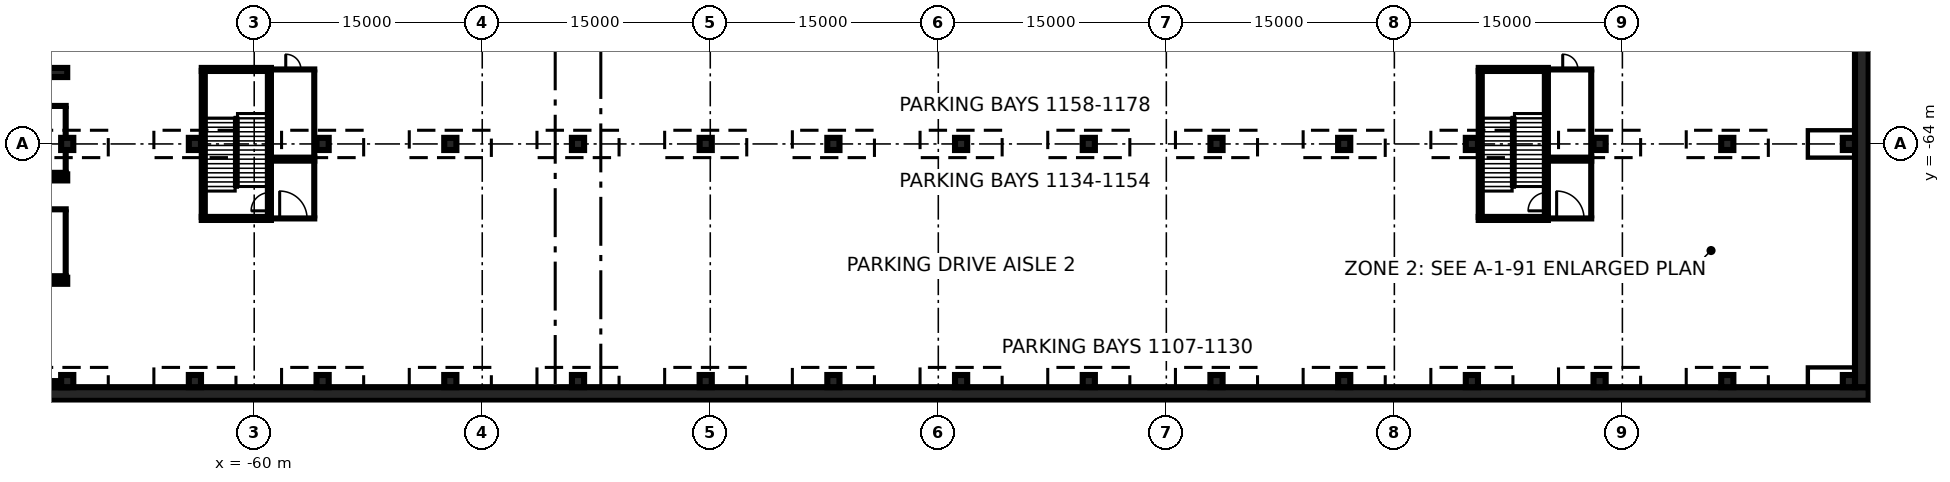
"""IFC4 building model, lengths in metres.
Left out: names, types, materials, properties, quantities, classifications, styles, units other than length and angle.
Written with IfcOpenShell. Run it as: python <this file> out.ifc"""

import sys

from ifc_helpers import new_model, si_unit, direction, frame, frame_2d, origin, origin_2d, place, context, subcontext, project, spatial, rectangle, extrude, element, fill, save


model = new_model("IFC4")
c1 = context("Model", 3, precision=1e-05, world=origin(), true_north=direction((0.0, 1.0)))
c2 = subcontext(c1, "Body", "Model", "MODEL_VIEW")
j1 = project(units=[si_unit("LENGTHUNIT", "METRE"), si_unit("PLANEANGLEUNIT", "RADIAN")], contexts=[c1])
p1 = place(None, origin())
s1 = spatial("IfcSite", under=j1, at=p1, CompositionType="ELEMENT")
p2 = place(p1, origin())
s2 = spatial("IfcBuilding", under=s1, at=p2, CompositionType="ELEMENT")
p3 = place(p2, frame((0.0, 0.0, -12.0)))
s3 = spatial("IfcBuildingStorey", under=s2, at=p3, CompositionType="ELEMENT", Elevation=-12.0)
p4 = place(p3, frame((-123.6, -80.45, 0.0), z_axis=(0.0, 0.0, 1.0), x_axis=(1.0, 0.0, 0.0)))
e1 = element("IfcWall", 1, at=p4, inside=s3, PredefinedType="USERDEFINED", context=c2, shape_type="SweptSolid", body=[
    extrude(rectangle(XDim=169.8, YDim=0.9, at=frame_2d((84.9, 0.0))), origin(), (0.0, 0.0, 1.0), 11.55),
])
p5 = place(p3, frame((45.75, -80.0, 0.0), z_axis=(0.0, 0.0, 1.0), x_axis=(0.0, 1.0, 0.0)))
e2 = element("IfcWall", 2, at=p5, inside=s3, PredefinedType="USERDEFINED", context=c2, shape_type="SweptSolid", body=[
    extrude(rectangle(XDim=160.0, YDim=0.9, at=frame_2d((80.0, 0.0))), origin(), (0.0, 0.0, 1.0), 11.55),
])
for number, where, z_axis, x_axis in (
    (3, (-72.3, -79.6, 0.0), (0.0, 0.0, 1.0), (1.0, 0.0, 0.0)),
    (4, (-72.3, -64.0, 0.0), (0.0, 0.0, 1.0), (1.0, 0.0, 0.0)),
    (5, (-63.9, -79.6, 0.0), (0.0, 0.0, 1.0), (1.0, 0.0, 0.0)),
    (6, (-63.9, -64.0, 0.0), (0.0, 0.0, 1.0), (1.0, 0.0, 0.0)),
    (7, (-55.5, -79.6, 0.0), (0.0, 0.0, 1.0), (1.0, 0.0, 0.0)),
    (8, (-55.5, -64.0, 0.0), (0.0, 0.0, 1.0), (1.0, 0.0, 0.0)),
    (9, (-47.1, -79.6, 0.0), (0.0, 0.0, 1.0), (1.0, 0.0, 0.0)),
    (10, (-47.1, -64.0, 0.0), (0.0, 0.0, 1.0), (1.0, 0.0, 0.0)),
    (11, (-38.7, -79.6, 0.0), (0.0, 0.0, 1.0), (1.0, 0.0, 0.0)),
    (12, (-38.7, -64.0, 0.0), (0.0, 0.0, 1.0), (1.0, 0.0, 0.0)),
    (13, (-30.3, -79.6, 0.0), (0.0, 0.0, 1.0), (1.0, 0.0, 0.0)),
    (14, (-30.3, -64.0, 0.0), (0.0, 0.0, 1.0), (1.0, 0.0, 0.0)),
    (15, (-21.9, -79.6, 0.0), (0.0, 0.0, 1.0), (1.0, 0.0, 0.0)),
    (16, (-21.9, -64.0, 0.0), (0.0, 0.0, 1.0), (1.0, 0.0, 0.0)),
    (17, (-13.5, -79.6, 0.0), (0.0, 0.0, 1.0), (1.0, 0.0, 0.0)),
    (18, (-13.5, -64.0, 0.0), (0.0, 0.0, 1.0), (1.0, 0.0, 0.0)),
    (19, (-5.1, -79.6, 0.0), (0.0, 0.0, 1.0), (1.0, 0.0, 0.0)),
    (20, (-5.1, -64.0, 0.0), (0.0, 0.0, 1.0), (1.0, 0.0, 0.0)),
    (21, (3.3, -79.6, 0.0), (0.0, 0.0, 1.0), (1.0, 0.0, 0.0)),
    (22, (3.3, -64.0, 0.0), (0.0, 0.0, 1.0), (1.0, 0.0, 0.0)),
    (23, (11.7, -79.6, 0.0), (0.0, 0.0, 1.0), (1.0, 0.0, 0.0)),
    (24, (11.7, -64.0, 0.0), (0.0, 0.0, 1.0), (1.0, 0.0, 0.0)),
    (25, (20.1, -79.6, 0.0), (0.0, 0.0, 1.0), (1.0, 0.0, 0.0)),
    (26, (20.1, -64.0, 0.0), (0.0, 0.0, 1.0), (1.0, 0.0, 0.0)),
    (27, (28.5, -79.6, 0.0), (0.0, 0.0, 1.0), (1.0, 0.0, 0.0)),
    (28, (28.5, -64.0, 0.0), (0.0, 0.0, 1.0), (1.0, 0.0, 0.0)),
    (29, (36.9, -79.6, 0.0), (0.0, 0.0, 1.0), (1.0, 0.0, 0.0)),
    (30, (36.9, -64.0, 0.0), (0.0, 0.0, 1.0), (1.0, 0.0, 0.0)),
    (31, (44.9, -79.6, 0.0), (0.0, 0.0, 1.0), (1.0, 0.0, 0.0)),
    (32, (44.9, -64.0, 0.0), (0.0, 0.0, 1.0), (1.0, 0.0, 0.0)),
):
    element("IfcColumn", number, at=place(p3, frame(where, z_axis=z_axis, x_axis=x_axis)), inside=s3, PredefinedType="COLUMN", context=c2, shape_type="SweptSolid", body=[
        extrude(rectangle(XDim=0.8, YDim=0.8, at=origin_2d()), origin(), (0.0, 0.0, 1.0), 4.4),
    ])
p6 = place(p3, frame((-79.3, -72.7, 0.0), z_axis=(0.0, 0.0, 1.0), x_axis=(1.0, 0.0, 0.0)))
e33 = element("IfcWall", 33, at=p6, inside=s3, PredefinedType="PARTITIONING", context=c2, shape_type="SweptSolid", body=[
    extrude(rectangle(XDim=7.0, YDim=0.2, at=frame_2d((3.5, 0.0))), origin(), (0.0, 0.0, 1.0), 4.4),
])
p7 = place(p3, frame((-79.3, -68.3, 0.0), z_axis=(0.0, 0.0, 1.0), x_axis=(1.0, 0.0, 0.0)))
e34 = element("IfcWall", 34, at=p7, inside=s3, PredefinedType="PARTITIONING", context=c2, shape_type="SweptSolid", body=[
    extrude(rectangle(XDim=7.0, YDim=0.2, at=frame_2d((3.5, 0.0))), origin(), (0.0, 0.0, 1.0), 4.4),
])
p8 = place(p7, frame((2.6, 0.0, 0.0)))
e35 = element("IfcOpeningElement", 35, at=p8, cuts=e34, PredefinedType="OPENING", context=c2, shape_type="SweptSolid", body=[
    extrude(rectangle(XDim=1.8, YDim=2.1, at=frame_2d((0.9, 1.05))), frame((0.0, 0.11, 0.0), z_axis=(0.0, -1.0, 0.0), x_axis=(1.0, 0.0, 0.0)), (0.0, 0.0, 1.0), 0.22),
])
p9 = place(p3, frame((-72.4, -72.6, 0.0), z_axis=(0.0, 0.0, 1.0), x_axis=(0.0, 1.0, 0.0)))
e36 = element("IfcWall", 36, at=p9, inside=s3, PredefinedType="PARTITIONING", context=c2, shape_type="SweptSolid", body=[
    extrude(rectangle(XDim=4.2, YDim=0.2, at=frame_2d((2.1, 0.0))), origin(), (0.0, 0.0, 1.0), 4.4),
])
p10 = place(p3, frame((-79.3, -65.9, 0.0), z_axis=(0.0, 0.0, 1.0), x_axis=(1.0, 0.0, 0.0)))
e37 = element("IfcWall", 37, at=p10, inside=s3, PredefinedType="PARTITIONING", context=c2, shape_type="SweptSolid", body=[
    extrude(rectangle(XDim=7.0, YDim=0.2, at=frame_2d((3.5, 0.0))), origin(), (0.0, 0.0, 1.0), 4.4),
])
p11 = place(p3, frame((-79.3, -61.5, 0.0), z_axis=(0.0, 0.0, 1.0), x_axis=(1.0, 0.0, 0.0)))
e38 = element("IfcWall", 38, at=p11, inside=s3, PredefinedType="PARTITIONING", context=c2, shape_type="SweptSolid", body=[
    extrude(rectangle(XDim=7.0, YDim=0.2, at=frame_2d((3.5, 0.0))), origin(), (0.0, 0.0, 1.0), 4.4),
])
p12 = place(p11, frame((2.6, 0.0, 0.0)))
e39 = element("IfcOpeningElement", 39, at=p12, cuts=e38, PredefinedType="OPENING", context=c2, shape_type="SweptSolid", body=[
    extrude(rectangle(XDim=1.8, YDim=2.1, at=frame_2d((0.9, 1.05))), frame((0.0, 0.11, 0.0), z_axis=(0.0, -1.0, 0.0), x_axis=(1.0, 0.0, 0.0)), (0.0, 0.0, 1.0), 0.22),
])
p13 = place(p3, frame((-72.4, -65.8, 0.0), z_axis=(0.0, 0.0, 1.0), x_axis=(0.0, 1.0, 0.0)))
e40 = element("IfcWall", 40, at=p13, inside=s3, PredefinedType="PARTITIONING", context=c2, shape_type="SweptSolid", body=[
    extrude(rectangle(XDim=1.4, YDim=0.2, at=frame_2d((0.7, 0.0))), origin(), (0.0, 0.0, 1.0), 4.4),
])
p14 = place(p3, frame((-72.4, -63.6, 0.0), z_axis=(0.0, 0.0, 1.0), x_axis=(0.0, 1.0, 0.0)))
e41 = element("IfcWall", 41, at=p14, inside=s3, PredefinedType="PARTITIONING", context=c2, shape_type="SweptSolid", body=[
    extrude(rectangle(XDim=2.0, YDim=0.2, at=frame_2d((1.0, 0.0))), origin(), (0.0, 0.0, 1.0), 4.4),
])
p15 = place(p3, frame((-58.9, -68.9, 0.0), z_axis=(0.0, 0.0, 1.0), x_axis=(1.0, 0.0, 0.0)))
e42 = element("IfcWall", 42, at=p15, inside=s3, PredefinedType="PARTITIONING", context=c2, shape_type="SweptSolid", body=[
    extrude(rectangle(XDim=2.95, YDim=0.2, at=frame_2d((1.475, 0.0))), origin(), (0.0, 0.0, 1.0), 4.4),
])
p16 = place(p15, frame((0.575, 0.0, 0.0)))
e43 = element("IfcOpeningElement", 43, at=p16, cuts=e42, PredefinedType="OPENING", context=c2, shape_type="SweptSolid", body=[
    extrude(rectangle(XDim=1.8, YDim=2.1, at=frame_2d((0.9, 1.05))), frame((0.0, 0.11, 0.0), z_axis=(0.0, -1.0, 0.0), x_axis=(1.0, 0.0, 0.0)), (0.0, 0.0, 1.0), 0.22),
])
p17 = place(p3, frame((-58.9, -65.1, 0.0), z_axis=(0.0, 0.0, 1.0), x_axis=(1.0, 0.0, 0.0)))
e44 = element("IfcWall", 44, at=p17, inside=s3, PredefinedType="PARTITIONING", context=c2, shape_type="SweptSolid", body=[
    extrude(rectangle(XDim=2.95, YDim=0.2, at=frame_2d((1.475, 0.0))), origin(), (0.0, 0.0, 1.0), 4.4),
])
p18 = place(p3, frame((-56.05, -68.8, 0.0), z_axis=(0.0, 0.0, 1.0), x_axis=(0.0, 1.0, 0.0)))
e45 = element("IfcWall", 45, at=p18, inside=s3, PredefinedType="PARTITIONING", context=c2, shape_type="SweptSolid", body=[
    extrude(rectangle(XDim=3.6, YDim=0.2, at=frame_2d((1.8, 0.0))), origin(), (0.0, 0.0, 1.0), 4.4),
])
p19 = place(p3, frame((-58.9, -64.9, 0.0), z_axis=(0.0, 0.0, 1.0), x_axis=(1.0, 0.0, 0.0)))
e46 = element("IfcWall", 46, at=p19, inside=s3, PredefinedType="PARTITIONING", context=c2, shape_type="SweptSolid", body=[
    extrude(rectangle(XDim=2.95, YDim=0.2, at=frame_2d((1.475, 0.0))), origin(), (0.0, 0.0, 1.0), 4.4),
])
p20 = place(p3, frame((-58.9, -59.1, 0.0), z_axis=(0.0, 0.0, 1.0), x_axis=(1.0, 0.0, 0.0)))
e47 = element("IfcWall", 47, at=p20, inside=s3, PredefinedType="PARTITIONING", context=c2, shape_type="SweptSolid", body=[
    extrude(rectangle(XDim=2.95, YDim=0.2, at=frame_2d((1.475, 0.0))), origin(), (0.0, 0.0, 1.0), 4.4),
])
p21 = place(p20, frame((0.975, 0.0, 0.0)))
e48 = element("IfcOpeningElement", 48, at=p21, cuts=e47, PredefinedType="OPENING", context=c2, shape_type="SweptSolid", body=[
    extrude(rectangle(XDim=1.0, YDim=2.1, at=frame_2d((0.5, 1.05))), frame((0.0, 0.11, 0.0), z_axis=(0.0, -1.0, 0.0), x_axis=(1.0, 0.0, 0.0)), (0.0, 0.0, 1.0), 0.22),
])
p22 = place(p3, frame((-56.05, -64.8, 0.0), z_axis=(0.0, 0.0, 1.0), x_axis=(0.0, 1.0, 0.0)))
e49 = element("IfcWall", 49, at=p22, inside=s3, PredefinedType="PARTITIONING", context=c2, shape_type="SweptSolid", body=[
    extrude(rectangle(XDim=5.6, YDim=0.2, at=frame_2d((2.8, 0.0))), origin(), (0.0, 0.0, 1.0), 4.4),
])
p23 = place(p3, frame((25.1, -68.9, 0.0), z_axis=(0.0, 0.0, 1.0), x_axis=(1.0, 0.0, 0.0)))
e50 = element("IfcWall", 50, at=p23, inside=s3, PredefinedType="PARTITIONING", context=c2, shape_type="SweptSolid", body=[
    extrude(rectangle(XDim=2.95, YDim=0.2, at=frame_2d((1.475, 0.0))), origin(), (0.0, 0.0, 1.0), 4.4),
])
p24 = place(p23, frame((0.575, 0.0, 0.0)))
e51 = element("IfcOpeningElement", 51, at=p24, cuts=e50, PredefinedType="OPENING", context=c2, shape_type="SweptSolid", body=[
    extrude(rectangle(XDim=1.8, YDim=2.1, at=frame_2d((0.9, 1.05))), frame((0.0, 0.11, 0.0), z_axis=(0.0, -1.0, 0.0), x_axis=(1.0, 0.0, 0.0)), (0.0, 0.0, 1.0), 0.22),
])
p25 = place(p3, frame((25.1, -65.1, 0.0), z_axis=(0.0, 0.0, 1.0), x_axis=(1.0, 0.0, 0.0)))
e52 = element("IfcWall", 52, at=p25, inside=s3, PredefinedType="PARTITIONING", context=c2, shape_type="SweptSolid", body=[
    extrude(rectangle(XDim=2.95, YDim=0.2, at=frame_2d((1.475, 0.0))), origin(), (0.0, 0.0, 1.0), 4.4),
])
p26 = place(p3, frame((27.95, -68.8, 0.0), z_axis=(0.0, 0.0, 1.0), x_axis=(0.0, 1.0, 0.0)))
e53 = element("IfcWall", 53, at=p26, inside=s3, PredefinedType="PARTITIONING", context=c2, shape_type="SweptSolid", body=[
    extrude(rectangle(XDim=3.6, YDim=0.2, at=frame_2d((1.8, 0.0))), origin(), (0.0, 0.0, 1.0), 4.4),
])
p27 = place(p3, frame((25.1, -64.9, 0.0), z_axis=(0.0, 0.0, 1.0), x_axis=(1.0, 0.0, 0.0)))
e54 = element("IfcWall", 54, at=p27, inside=s3, PredefinedType="PARTITIONING", context=c2, shape_type="SweptSolid", body=[
    extrude(rectangle(XDim=2.95, YDim=0.2, at=frame_2d((1.475, 0.0))), origin(), (0.0, 0.0, 1.0), 4.4),
])
p28 = place(p3, frame((25.1, -59.1, 0.0), z_axis=(0.0, 0.0, 1.0), x_axis=(1.0, 0.0, 0.0)))
e55 = element("IfcWall", 55, at=p28, inside=s3, PredefinedType="PARTITIONING", context=c2, shape_type="SweptSolid", body=[
    extrude(rectangle(XDim=2.95, YDim=0.2, at=frame_2d((1.475, 0.0))), origin(), (0.0, 0.0, 1.0), 4.4),
])
p29 = place(p28, frame((0.975, 0.0, 0.0)))
e56 = element("IfcOpeningElement", 56, at=p29, cuts=e55, PredefinedType="OPENING", context=c2, shape_type="SweptSolid", body=[
    extrude(rectangle(XDim=1.0, YDim=2.1, at=frame_2d((0.5, 1.05))), frame((0.0, 0.11, 0.0), z_axis=(0.0, -1.0, 0.0), x_axis=(1.0, 0.0, 0.0)), (0.0, 0.0, 1.0), 0.22),
])
p30 = place(p3, frame((27.95, -64.8, 0.0), z_axis=(0.0, 0.0, 1.0), x_axis=(0.0, 1.0, 0.0)))
e57 = element("IfcWall", 57, at=p30, inside=s3, PredefinedType="PARTITIONING", context=c2, shape_type="SweptSolid", body=[
    extrude(rectangle(XDim=5.6, YDim=0.2, at=frame_2d((2.8, 0.0))), origin(), (0.0, 0.0, 1.0), 4.4),
])
p31 = place(p3, frame((-63.35, -68.8, 0.0), z_axis=(0.0, 0.0, 1.0), x_axis=(0.0, 1.0, 0.0)))
e58 = element("IfcWall", 58, at=p31, inside=s3, PredefinedType="SOLIDWALL", context=c2, shape_type="SweptSolid", body=[
    extrude(rectangle(XDim=9.6, YDim=0.2, at=frame_2d((4.8, 0.0))), origin(), (0.0, 0.0, 1.0), 4.4),
])
p32 = place(p3, frame((-59.0, -68.8, 0.0), z_axis=(0.0, 0.0, 1.0), x_axis=(0.0, 1.0, 0.0)))
e59 = element("IfcWall", 59, at=p32, inside=s3, PredefinedType="SOLIDWALL", context=c2, shape_type="SweptSolid", body=[
    extrude(rectangle(XDim=9.6, YDim=0.2, at=frame_2d((4.8, 0.0))), origin(), (0.0, 0.0, 1.0), 4.4),
])
p33 = place(p32, frame((0.4, 0.0, 0.0)))
e60 = element("IfcOpeningElement", 60, at=p33, cuts=e59, PredefinedType="OPENING", context=c2, shape_type="SweptSolid", body=[
    extrude(rectangle(XDim=1.2, YDim=2.1, at=frame_2d((0.6, 1.05))), frame((0.0, 0.11, 0.0), z_axis=(0.0, -1.0, 0.0), x_axis=(1.0, 0.0, 0.0)), (0.0, 0.0, 1.0), 0.22),
])
for number, where, z_axis, x_axis in (
    (61, (-58.9, -68.9, 0.0), (0.0, 0.0, 1.0), (-1.0, 0.0, 0.0)),
    (62, (-63.45, -59.1, 0.0), (0.0, 0.0, 1.0), (1.0, 0.0, 0.0)),
):
    element("IfcWall", number, at=place(p3, frame(where, z_axis=z_axis, x_axis=x_axis)), inside=s3, PredefinedType="SOLIDWALL", context=c2, shape_type="SweptSolid", body=[
        extrude(rectangle(XDim=4.55, YDim=0.2, at=frame_2d((2.275, 0.0))), origin(), (0.0, 0.0, 1.0), 4.4),
    ])
p34 = place(p3, frame((20.65, -68.8, 0.0), z_axis=(0.0, 0.0, 1.0), x_axis=(0.0, 1.0, 0.0)))
e63 = element("IfcWall", 63, at=p34, inside=s3, PredefinedType="SOLIDWALL", context=c2, shape_type="SweptSolid", body=[
    extrude(rectangle(XDim=9.6, YDim=0.2, at=frame_2d((4.8, 0.0))), origin(), (0.0, 0.0, 1.0), 4.4),
])
p35 = place(p3, frame((25.0, -68.8, 0.0), z_axis=(0.0, 0.0, 1.0), x_axis=(0.0, 1.0, 0.0)))
e64 = element("IfcWall", 64, at=p35, inside=s3, PredefinedType="SOLIDWALL", context=c2, shape_type="SweptSolid", body=[
    extrude(rectangle(XDim=9.6, YDim=0.2, at=frame_2d((4.8, 0.0))), origin(), (0.0, 0.0, 1.0), 4.4),
])
p36 = place(p35, frame((0.4, 0.0, 0.0)))
e65 = element("IfcOpeningElement", 65, at=p36, cuts=e64, PredefinedType="OPENING", context=c2, shape_type="SweptSolid", body=[
    extrude(rectangle(XDim=1.2, YDim=2.1, at=frame_2d((0.6, 1.05))), frame((0.0, 0.11, 0.0), z_axis=(0.0, -1.0, 0.0), x_axis=(1.0, 0.0, 0.0)), (0.0, 0.0, 1.0), 0.22),
])
for number, where, z_axis, x_axis in (
    (66, (25.1, -68.9, 0.0), (0.0, 0.0, 1.0), (-1.0, 0.0, 0.0)),
    (67, (20.55, -59.1, 0.0), (0.0, 0.0, 1.0), (1.0, 0.0, 0.0)),
):
    element("IfcWall", number, at=place(p3, frame(where, z_axis=z_axis, x_axis=x_axis)), inside=s3, PredefinedType="SOLIDWALL", context=c2, shape_type="SweptSolid", body=[
        extrude(rectangle(XDim=4.55, YDim=0.2, at=frame_2d((2.275, 0.0))), origin(), (0.0, 0.0, 1.0), 4.4),
    ])
for number, where, z_axis, x_axis in (
    (68, (-111.0, -79.8, 0.0), (0.0, 0.0, 1.0), (1.0, 0.0, 0.0)),
    (69, (-111.0, -73.0, 0.0), (0.0, 0.0, 1.0), (1.0, 0.0, 0.0)),
):
    element("IfcWall", number, at=place(p3, frame(where, z_axis=z_axis, x_axis=x_axis)), inside=s3, PredefinedType="SOLIDWALL", context=c2, shape_type="SweptSolid", body=[
        extrude(rectangle(XDim=38.7, YDim=0.4, at=frame_2d((19.35, 0.0))), origin(), (0.0, 0.0, 1.0), 4.4),
    ])
p37 = place(p3, frame((-114.3, -66.2, 0.0), z_axis=(0.0, 0.0, 1.0), x_axis=(1.0, 0.0, 0.0)))
e70 = element("IfcWall", 70, at=p37, inside=s3, PredefinedType="SOLIDWALL", context=c2, shape_type="SweptSolid", body=[
    extrude(rectangle(XDim=42.0, YDim=0.4, at=frame_2d((21.0, 0.0))), origin(), (0.0, 0.0, 1.0), 4.4),
])
p38 = place(p3, frame((-114.3, -59.3, 0.0), z_axis=(0.0, 0.0, 1.0), x_axis=(1.0, 0.0, 0.0)))
e71 = element("IfcWall", 71, at=p38, inside=s3, PredefinedType="SOLIDWALL", context=c2, shape_type="SweptSolid", body=[
    extrude(rectangle(XDim=42.0, YDim=0.6, at=frame_2d((21.0, 0.0))), origin(), (0.0, 0.0, 1.0), 4.4),
])
p39 = place(p16, origin())
e72 = element("IfcDoor", 72, at=p39, inside=s3, OperationType="DOUBLE_DOOR_SINGLE_SWING", PredefinedType="DOOR", context=c2, shape_type="SweptSolid", body=[
    extrude(rectangle(XDim=1.8, YDim=2.1, at=frame_2d((0.9, 1.05))), frame((0.0, 0.025, 0.0), z_axis=(0.0, -1.0, 0.0), x_axis=(1.0, 0.0, 0.0)), (0.0, 0.0, 1.0), 0.05),
])
fill(e43, e72)
p40 = place(p21, origin())
e73 = element("IfcDoor", 73, at=p40, inside=s3, OperationType="SINGLE_SWING_LEFT", PredefinedType="DOOR", context=c2, shape_type="SweptSolid", body=[
    extrude(rectangle(XDim=1.0, YDim=2.1, at=frame_2d((0.5, 1.05))), frame((0.0, 0.025, 0.0), z_axis=(0.0, -1.0, 0.0), x_axis=(1.0, 0.0, 0.0)), (0.0, 0.0, 1.0), 0.05),
])
fill(e48, e73)
p41 = place(p24, origin())
e74 = element("IfcDoor", 74, at=p41, inside=s3, OperationType="DOUBLE_DOOR_SINGLE_SWING", PredefinedType="DOOR", context=c2, shape_type="SweptSolid", body=[
    extrude(rectangle(XDim=1.8, YDim=2.1, at=frame_2d((0.9, 1.05))), frame((0.0, 0.025, 0.0), z_axis=(0.0, -1.0, 0.0), x_axis=(1.0, 0.0, 0.0)), (0.0, 0.0, 1.0), 0.05),
])
fill(e51, e74)
p42 = place(p29, origin())
e75 = element("IfcDoor", 75, at=p42, inside=s3, OperationType="SINGLE_SWING_LEFT", PredefinedType="DOOR", context=c2, shape_type="SweptSolid", body=[
    extrude(rectangle(XDim=1.0, YDim=2.1, at=frame_2d((0.5, 1.05))), frame((0.0, 0.025, 0.0), z_axis=(0.0, -1.0, 0.0), x_axis=(1.0, 0.0, 0.0)), (0.0, 0.0, 1.0), 0.05),
])
fill(e56, e75)
p43 = place(p33, origin())
e76 = element("IfcDoor", 76, at=p43, inside=s3, OperationType="SINGLE_SWING_LEFT", PredefinedType="DOOR", context=c2, shape_type="SweptSolid", body=[
    extrude(rectangle(XDim=1.2, YDim=2.1, at=frame_2d((0.6, 1.05))), frame((0.0, 0.025, 0.0), z_axis=(0.0, -1.0, 0.0), x_axis=(1.0, 0.0, 0.0)), (0.0, 0.0, 1.0), 0.05),
])
fill(e60, e76)
p44 = place(p36, origin())
e77 = element("IfcDoor", 77, at=p44, inside=s3, OperationType="SINGLE_SWING_LEFT", PredefinedType="DOOR", context=c2, shape_type="SweptSolid", body=[
    extrude(rectangle(XDim=1.2, YDim=2.1, at=frame_2d((0.6, 1.05))), frame((0.0, 0.025, 0.0), z_axis=(0.0, -1.0, 0.0), x_axis=(1.0, 0.0, 0.0)), (0.0, 0.0, 1.0), 0.05),
])
fill(e65, e77)
save(model, sys.argv[1])
